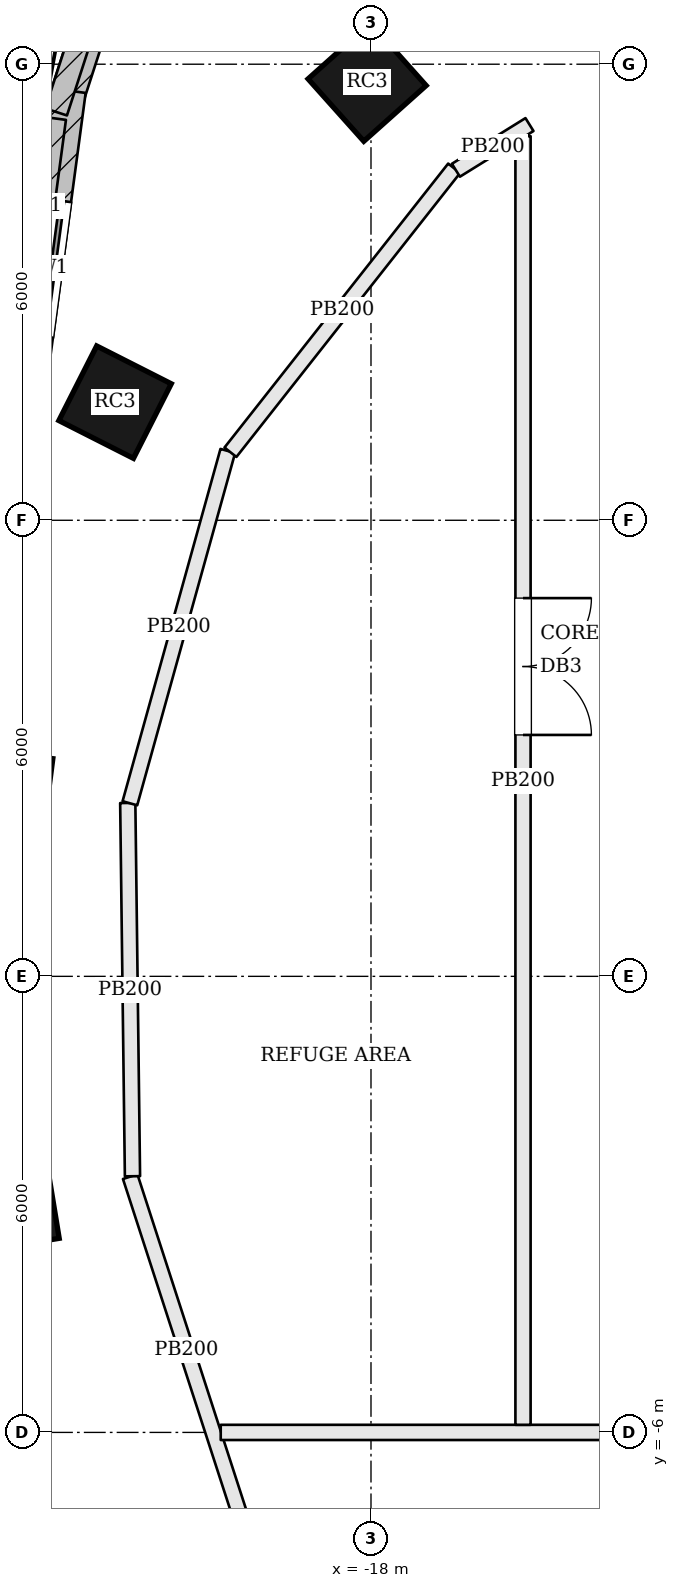
"""IFC4 building model, lengths in metres.
Left out: names, types, materials, properties, quantities, classifications, styles, units other than length and angle.
Written with IfcOpenShell. Run it as: python <this file> out.ifc"""

import sys

from ifc_helpers import new_model, si_unit, direction, frame, frame_2d, origin, origin_2d, place, context, subcontext, project, spatial, rectangle, extrude, element, fill, save


model = new_model("IFC4")
c1 = context("Model", 3, precision=1e-05, world=origin(), true_north=direction((0.0, 1.0)))
c2 = subcontext(c1, "Body", "Model", "MODEL_VIEW")
j1 = project(units=[si_unit("LENGTHUNIT", "METRE"), si_unit("PLANEANGLEUNIT", "RADIAN")], contexts=[c1])
p1 = place(None, origin())
s1 = spatial("IfcSite", under=j1, at=p1, CompositionType="ELEMENT")
p2 = place(p1, origin())
s2 = spatial("IfcBuilding", under=s1, at=p2, CompositionType="ELEMENT")
p3 = place(p2, frame((0.0, 0.0, 150.0)))
s3 = spatial("IfcBuildingStorey", under=s2, at=p3, CompositionType="ELEMENT", Elevation=150.0)
for number, where, z_axis, x_axis in (
    (1, (-18.051, 11.763, 0.0), (0.0, 0.0, 1.0), (-0.746, -0.666, 0.0)),
    (2, (-21.367, 7.554, 0.0), (0.0, 0.0, 1.0), (-0.452, -0.892, 0.0)),
    (3, (-22.802, 2.389, 0.0), (0.0, 0.0, 1.0), (-0.129, -0.992, 0.0)),
    (4, (-22.734, -2.993, 0.0), (0.0, 0.0, 1.0), (0.162, -0.987, 0.0)),
):
    element("IfcColumn", number, at=place(p3, frame(where, z_axis=z_axis, x_axis=x_axis)), inside=s3, PredefinedType="COLUMN", context=c2, shape_type="SweptSolid", body=[
        extrude(rectangle(XDim=1.1, YDim=1.1, at=origin_2d()), origin(), (0.0, 0.0, 1.0), 3.9),
    ])
p4 = place(p3, frame((-20.819, 15.213, 0.0), z_axis=(0.0, 0.0, 1.0), x_axis=(-0.308282259578, -0.95129493241, 0.0)))
e5 = element("IfcWall", 5, at=p4, inside=s3, PredefinedType="SOLIDWALL", context=c2, shape_type="SweptSolid", body=[
    extrude(rectangle(XDim=3.785, YDim=0.45, at=frame_2d((1.892, 0.0))), origin(), (0.0, 0.0, 1.0), 3.7),
])
p5 = place(p4, frame((0.842, 0.0, 0.9)))
e6 = element("IfcOpeningElement", 6, at=p5, cuts=e5, PredefinedType="OPENING", context=c2, shape_type="SweptSolid", body=[
    extrude(rectangle(XDim=2.1, YDim=2.3, at=frame_2d((1.05, 1.15))), frame((0.0, 0.235, 0.0), z_axis=(0.0, -1.0, 0.0), x_axis=(1.0, 0.0, 0.0)), (0.0, 0.0, 1.0), 0.47),
])
p6 = place(p3, frame((-21.977, 11.652, 0.0), z_axis=(0.0, 0.0, 1.0), x_axis=(-0.132606175271, -0.991168806148, 0.0)))
e7 = element("IfcWall", 7, at=p6, inside=s3, PredefinedType="SOLIDWALL", context=c2, shape_type="SweptSolid", body=[
    extrude(rectangle(XDim=4.698, YDim=0.45, at=frame_2d((2.349, 0.0))), origin(), (0.0, 0.0, 1.0), 3.7),
])
p7 = place(p6, frame((1.449, 0.0, 0.9)))
e8 = element("IfcOpeningElement", 8, at=p7, cuts=e7, PredefinedType="OPENING", context=c2, shape_type="SweptSolid", body=[
    extrude(rectangle(XDim=1.8, YDim=2.3, at=frame_2d((0.9, 1.15))), frame((0.0, 0.235, 0.0), z_axis=(0.0, -1.0, 0.0), x_axis=(1.0, 0.0, 0.0)), (0.0, 0.0, 1.0), 0.47),
])
p8 = place(p3, frame((-20.928, 15.119, 3.9), z_axis=(0.0, 0.0, 1.0), x_axis=(-0.30831369753, -0.951284743868, 0.0)))
e9 = element("IfcWall", 9, at=p8, inside=s3, PredefinedType="PARAPET", context=c2, shape_type="SweptSolid", body=[
    extrude(rectangle(XDim=3.939, YDim=0.3, at=frame_2d((1.969, 0.0))), origin(), (0.0, 0.0, 1.0), 1.1),
])
p9 = place(p3, frame((-22.162, 11.288, 3.9), z_axis=(0.0, 0.0, 1.0), x_axis=(-0.132583148979, -0.991171886509, 0.0)))
e10 = element("IfcWall", 10, at=p9, inside=s3, PredefinedType="PARAPET", context=c2, shape_type="SweptSolid", body=[
    extrude(rectangle(XDim=2.326, YDim=0.3, at=frame_2d((1.163, 0.0))), origin(), (0.0, 0.0, 1.0), 1.1),
])
p10 = place(p3, frame((-19.689, -7.195, 0.0), z_axis=(0.0, 0.0, 1.0), x_axis=(-0.308517152125, 0.951218779695, 0.0)))
e11 = element("IfcWall", 11, at=p10, inside=s3, PredefinedType="PARTITIONING", context=c2, shape_type="SweptSolid", body=[
    extrude(rectangle(XDim=4.794, YDim=0.2, at=frame_2d((2.397, 0.0))), origin(), (0.0, 0.0, 1.0), 3.7),
])
p11 = place(p3, frame((-19.977, -6.0, 0.0), z_axis=(0.0, 0.0, 1.0), x_axis=(1.0, 0.0, 0.0)))
e12 = element("IfcWall", 12, at=p11, inside=s3, PredefinedType="PARTITIONING", context=c2, shape_type="SweptSolid", body=[
    extrude(rectangle(XDim=40.015, YDim=0.2, at=frame_2d((20.008, 0.0))), origin(), (0.0, 0.0, 1.0), 3.7),
])
p12 = place(p11, frame((19.077, 0.0, 0.0)))
e13 = element("IfcOpeningElement", 13, at=p12, cuts=e12, PredefinedType="OPENING", context=c2, shape_type="SweptSolid", body=[
    extrude(rectangle(XDim=1.8, YDim=2.1, at=frame_2d((0.9, 1.05))), frame((0.0, 0.11, 0.0), z_axis=(0.0, -1.0, 0.0), x_axis=(1.0, 0.0, 0.0)), (0.0, 0.0, 1.0), 0.22),
])
p13 = place(p3, frame((-21.138, -2.63, 0.0), z_axis=(0.0, 0.0, 1.0), x_axis=(-0.012626385888, 0.999920284012, 0.0)))
e14 = element("IfcWall", 14, at=p13, inside=s3, PredefinedType="PARTITIONING", context=c2, shape_type="SweptSolid", body=[
    extrude(rectangle(XDim=4.911, YDim=0.2, at=frame_2d((2.456, 0.0))), origin(), (0.0, 0.0, 1.0), 3.7),
])
p14 = place(p3, frame((-21.172, 2.277, 0.0), z_axis=(0.0, 0.0, 1.0), x_axis=(0.267756413289, 0.963486638798, 0.0)))
e15 = element("IfcWall", 15, at=p14, inside=s3, PredefinedType="PARTITIONING", context=c2, shape_type="SweptSolid", body=[
    extrude(rectangle(XDim=4.811, YDim=0.2, at=frame_2d((2.405, 0.0))), origin(), (0.0, 0.0, 1.0), 3.7),
])
p15 = place(p3, frame((-19.849, 6.895, 0.0), z_axis=(0.0, 0.0, 1.0), x_axis=(0.618811760178, 0.785539308669, 0.0)))
e16 = element("IfcWall", 16, at=p15, inside=s3, PredefinedType="PARTITIONING", context=c2, shape_type="SweptSolid", body=[
    extrude(rectangle(XDim=4.756, YDim=0.2, at=frame_2d((2.378, 0.0))), origin(), (0.0, 0.0, 1.0), 3.7),
])
p16 = place(p3, frame((-16.883, 10.605, 0.0), z_axis=(0.0, 0.0, 1.0), x_axis=(0.84954745962, 0.527512193085, 0.0)))
e17 = element("IfcWall", 17, at=p16, inside=s3, PredefinedType="PARTITIONING", context=c2, shape_type="SweptSolid", body=[
    extrude(rectangle(XDim=1.139, YDim=0.2, at=frame_2d((0.57, 0.0))), origin(), (0.0, 0.0, 1.0), 3.7),
])
p17 = place(p3, frame((-16.0, 11.053, 0.0), z_axis=(0.0, 0.0, 1.0), x_axis=(0.0, -1.0, 0.0)))
e18 = element("IfcWall", 18, at=p17, inside=s3, PredefinedType="PARTITIONING", context=c2, shape_type="SweptSolid", body=[
    extrude(rectangle(XDim=16.953, YDim=0.2, at=frame_2d((8.477, 0.0))), origin(), (0.0, 0.0, 1.0), 3.7),
])
p18 = place(p17, frame((6.077, 0.0, 0.0)))
e19 = element("IfcOpeningElement", 19, at=p18, cuts=e18, PredefinedType="OPENING", context=c2, shape_type="SweptSolid", body=[
    extrude(rectangle(XDim=1.8, YDim=2.1, at=frame_2d((0.9, 1.05))), frame((0.0, 0.11, 0.0), z_axis=(0.0, -1.0, 0.0), x_axis=(1.0, 0.0, 0.0)), (0.0, 0.0, 1.0), 0.22),
])
p19 = place(p7, origin())
e20 = element("IfcWindow", 20, at=p19, inside=s3, PartitioningType="SINGLE_PANEL", PredefinedType="WINDOW", context=c2, shape_type="SweptSolid", body=[
    extrude(rectangle(XDim=1.8, YDim=2.3, at=frame_2d((0.9, 1.15))), frame((0.0, 0.135, 0.0), z_axis=(0.0, -1.0, 0.0), x_axis=(1.0, 0.0, 0.0)), (0.0, 0.0, 1.0), 0.06),
])
fill(e8, e20)
p20 = place(p18, origin())
e21 = element("IfcDoor", 21, at=p20, inside=s3, OperationType="DOUBLE_DOOR_SINGLE_SWING", PredefinedType="DOOR", context=c2, shape_type="SweptSolid", body=[
    extrude(rectangle(XDim=1.8, YDim=2.1, at=frame_2d((0.9, 1.05))), frame((0.0, 0.025, 0.0), z_axis=(0.0, -1.0, 0.0), x_axis=(1.0, 0.0, 0.0)), (0.0, 0.0, 1.0), 0.05),
])
fill(e19, e21)
save(model, sys.argv[1])
